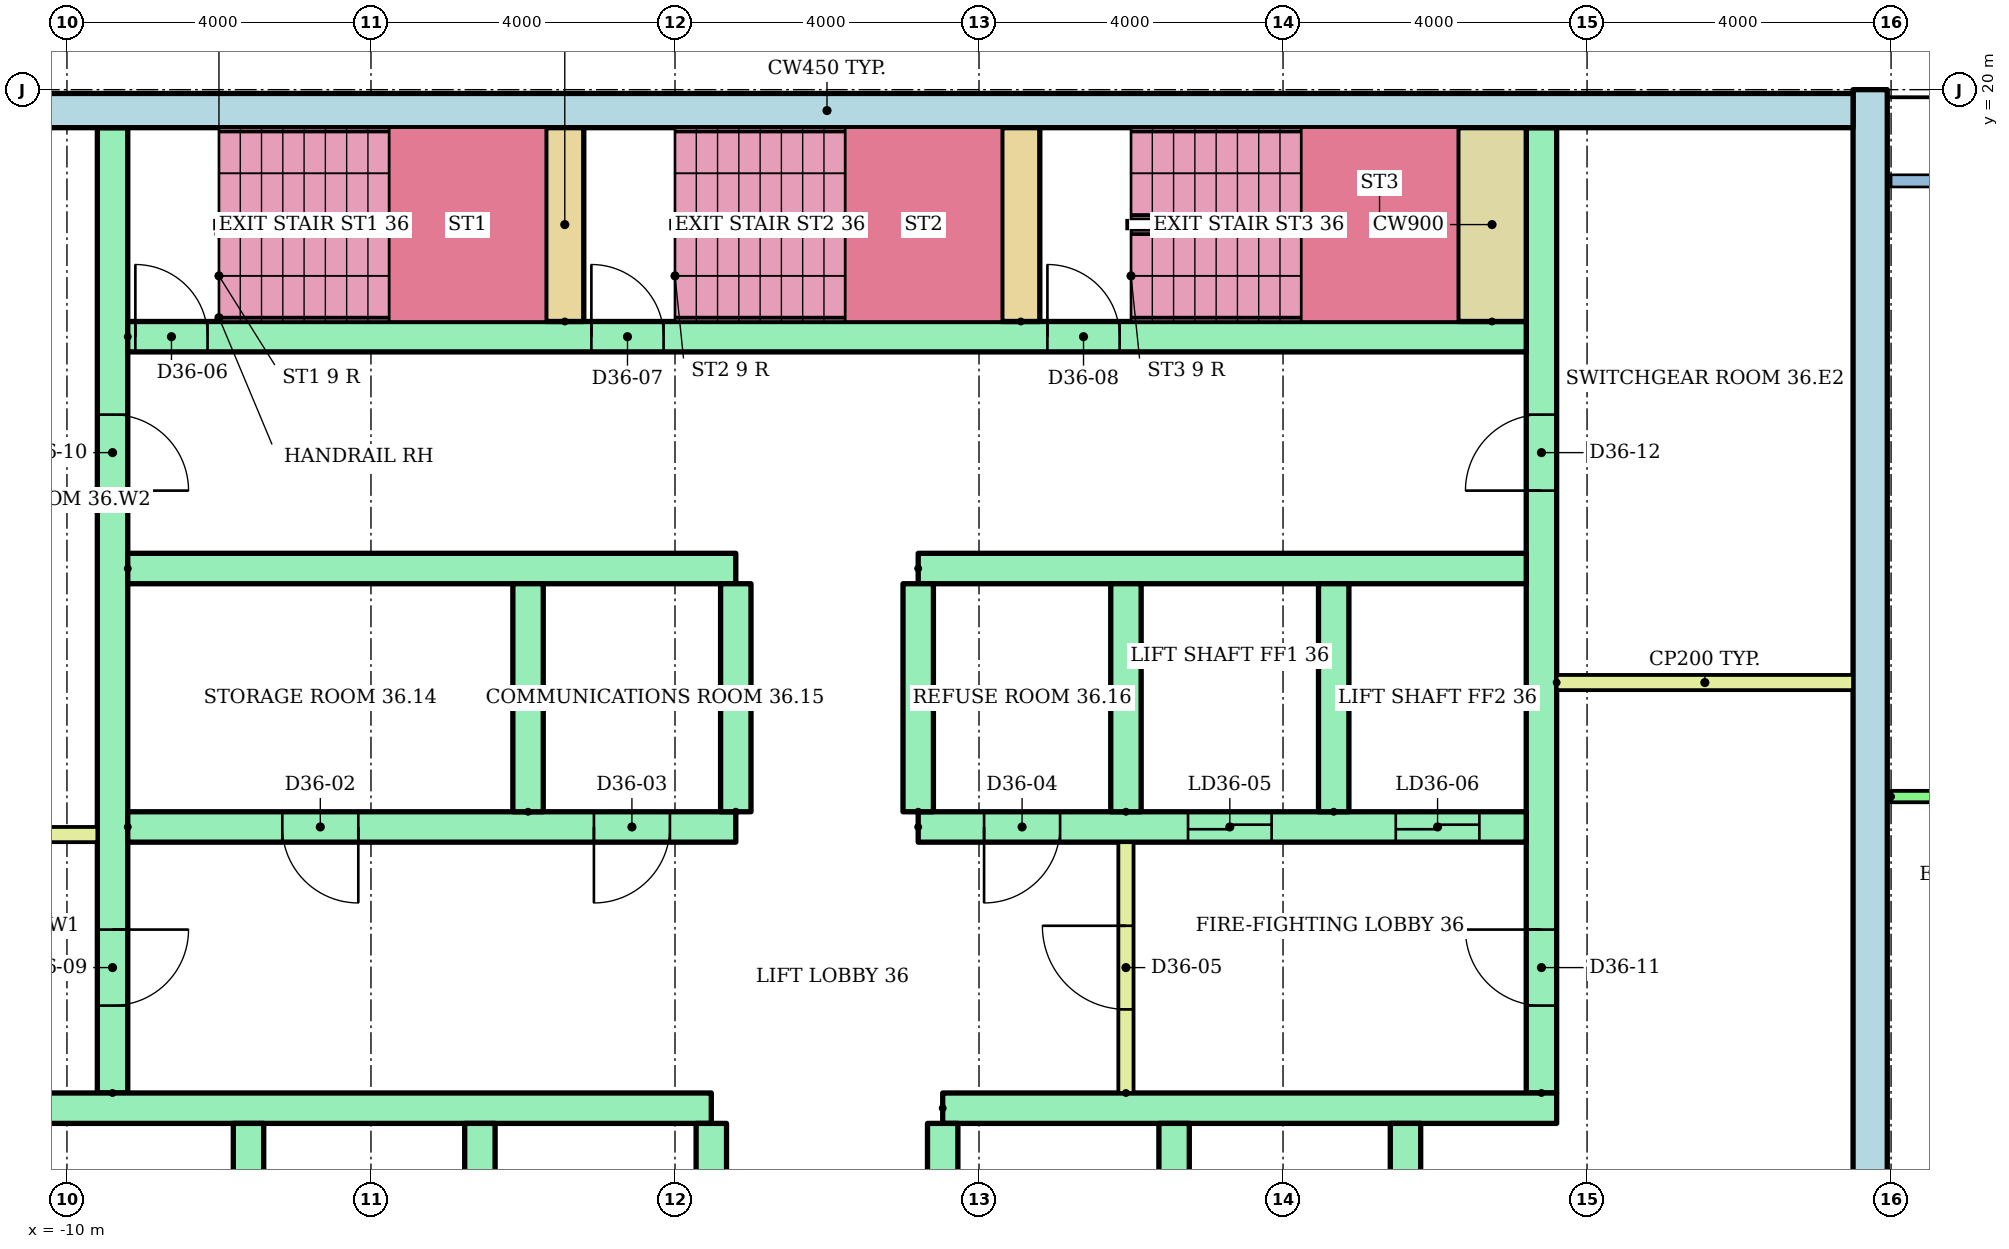
"""IFC4 building model, lengths in metres.
Left out: names, types, materials, properties, quantities, classifications, styles, units other than length and angle.
Written with IfcOpenShell. Run it as: python <this file> out.ifc"""

import sys

from ifc_helpers import new_model, si_unit, direction, frame, frame_2d, origin, place, context, subcontext, project, spatial, rectangle, extrude, element, fill, save


model = new_model("IFC4")
c1 = context("Model", 3, precision=1e-05, world=origin(), true_north=direction((0.0, 1.0)))
c2 = subcontext(c1, "Body", "Model", "MODEL_VIEW")
j1 = project(units=[si_unit("LENGTHUNIT", "METRE"), si_unit("PLANEANGLEUNIT", "RADIAN")], contexts=[c1])
p1 = place(None, origin())
s1 = spatial("IfcSite", under=j1, at=p1, CompositionType="ELEMENT")
p2 = place(p1, origin())
s2 = spatial("IfcBuilding", under=s1, at=p2, CompositionType="ELEMENT")
p3 = place(p2, frame((0.0, 0.0, 139.0)))
s3 = spatial("IfcBuildingStorey", under=s2, at=p3, CompositionType="ELEMENT", Elevation=139.0)
p4 = place(p3, frame((13.725, 3.0, 0.0), z_axis=(0.0, 0.0, 1.0), x_axis=(0.0, 1.0, 0.0)))
e1 = element("IfcWall", 1, at=p4, inside=s3, PredefinedType="SHEAR", context=c2, shape_type="SweptSolid", body=[
    extrude(rectangle(XDim=17.0, YDim=0.45, at=frame_2d((8.5, 0.0))), origin(), (0.0, 0.0, 1.0), 2.92),
])
p5 = place(p3, frame((-13.5, 19.725, 0.0)))
e2 = element("IfcWall", 2, at=p5, inside=s3, PredefinedType="SHEAR", context=c2, shape_type="SweptSolid", body=[
    extrude(rectangle(XDim=27.0, YDim=0.45, at=frame_2d((13.5, 0.0))), origin(), (0.0, 0.0, 1.0), 2.92),
])
p6 = place(p3, frame((-9.4, 6.8, 0.0), z_axis=(0.0, 0.0, 1.0), x_axis=(0.0, 1.0, 0.0)))
e3 = element("IfcWall", 3, at=p6, inside=s3, PredefinedType="SHEAR", context=c2, shape_type="SweptSolid", body=[
    extrude(rectangle(XDim=12.7, YDim=0.4, at=frame_2d((6.35, 0.0))), origin(), (0.0, 0.0, 1.0), 2.92),
])
p7 = place(p6, frame((1.15, 0.0, 0.0)))
e4 = element("IfcOpeningElement", 4, at=p7, cuts=e3, PredefinedType="OPENING", context=c2, shape_type="SweptSolid", body=[
    extrude(rectangle(XDim=1.0, YDim=2.1, at=frame_2d((0.5, 1.05))), frame((0.0, 0.21, 0.0), z_axis=(0.0, -1.0, 0.0), x_axis=(1.0, 0.0, 0.0)), (0.0, 0.0, 1.0), 0.42),
])
p8 = place(p6, frame((7.925, 0.0, 0.0)))
e5 = element("IfcOpeningElement", 5, at=p8, cuts=e3, PredefinedType="OPENING", context=c2, shape_type="SweptSolid", body=[
    extrude(rectangle(XDim=1.0, YDim=2.1, at=frame_2d((0.5, 1.05))), frame((0.0, 0.21, 0.0), z_axis=(0.0, -1.0, 0.0), x_axis=(1.0, 0.0, 0.0)), (0.0, 0.0, 1.0), 0.42),
])
p9 = place(p3, frame((9.4, 6.8, 0.0), z_axis=(0.0, 0.0, 1.0), x_axis=(0.0, 1.0, 0.0)))
e6 = element("IfcWall", 6, at=p9, inside=s3, PredefinedType="SHEAR", context=c2, shape_type="SweptSolid", body=[
    extrude(rectangle(XDim=12.7, YDim=0.4, at=frame_2d((6.35, 0.0))), origin(), (0.0, 0.0, 1.0), 2.92),
])
p10 = place(p9, frame((1.15, 0.0, 0.0)))
e7 = element("IfcOpeningElement", 7, at=p10, cuts=e6, PredefinedType="OPENING", context=c2, shape_type="SweptSolid", body=[
    extrude(rectangle(XDim=1.0, YDim=2.1, at=frame_2d((0.5, 1.05))), frame((0.0, 0.21, 0.0), z_axis=(0.0, -1.0, 0.0), x_axis=(1.0, 0.0, 0.0)), (0.0, 0.0, 1.0), 0.42),
])
p11 = place(p9, frame((7.925, 0.0, 0.0)))
e8 = element("IfcOpeningElement", 8, at=p11, cuts=e6, PredefinedType="OPENING", context=c2, shape_type="SweptSolid", body=[
    extrude(rectangle(XDim=1.0, YDim=2.1, at=frame_2d((0.5, 1.05))), frame((0.0, 0.21, 0.0), z_axis=(0.0, -1.0, 0.0), x_axis=(1.0, 0.0, 0.0)), (0.0, 0.0, 1.0), 0.42),
])
p12 = place(p3, frame((-13.5, 6.6, 0.0)))
e9 = element("IfcWall", 9, at=p12, inside=s3, PredefinedType="SHEAR", context=c2, shape_type="SweptSolid", body=[
    extrude(rectangle(XDim=11.978, YDim=0.4, at=frame_2d((5.989, 0.0))), origin(), (0.0, 0.0, 1.0), 2.92),
])
p13 = place(p3, frame((1.522, 6.6, 0.0)))
e10 = element("IfcWall", 10, at=p13, inside=s3, PredefinedType="SHEAR", context=c2, shape_type="SweptSolid", body=[
    extrude(rectangle(XDim=8.078, YDim=0.4, at=frame_2d((4.039, 0.0))), origin(), (0.0, 0.0, 1.0), 2.92),
])
for number, where, z_axis, x_axis in (
    (11, (-7.611, 3.4, 0.0), (0.0, 0.0, 1.0), (0.0, 1.0, 0.0)),
    (12, (-4.567, 3.4, 0.0), (0.0, 0.0, 1.0), (0.0, 1.0, 0.0)),
    (13, (-1.522, 3.4, 0.0), (0.0, 0.0, 1.0), (0.0, 1.0, 0.0)),
    (14, (1.522, 3.4, 0.0), (0.0, 0.0, 1.0), (0.0, 1.0, 0.0)),
    (15, (4.567, 3.4, 0.0), (0.0, 0.0, 1.0), (0.0, 1.0, 0.0)),
    (16, (7.611, 3.4, 0.0), (0.0, 0.0, 1.0), (0.0, 1.0, 0.0)),
):
    element("IfcWall", number, at=place(p3, frame(where, z_axis=z_axis, x_axis=x_axis)), inside=s3, PredefinedType="SHEAR", context=c2, shape_type="SweptSolid", body=[
        extrude(rectangle(XDim=3.0, YDim=0.4, at=frame_2d((1.5, 0.0))), origin(), (0.0, 0.0, 1.0), 2.92),
    ])
p14 = place(p3, frame((-9.2, 10.3, 0.0)))
e17 = element("IfcWall", 17, at=p14, inside=s3, PredefinedType="SHEAR", context=c2, shape_type="SweptSolid", body=[
    extrude(rectangle(XDim=8.0, YDim=0.4, at=frame_2d((4.0, 0.0))), origin(), (0.0, 0.0, 1.0), 2.92),
])
p15 = place(p14, frame((2.033, 0.0, 0.0)))
e18 = element("IfcOpeningElement", 18, at=p15, cuts=e17, PredefinedType="OPENING", context=c2, shape_type="SweptSolid", body=[
    extrude(rectangle(XDim=1.0, YDim=2.1, at=frame_2d((0.5, 1.05))), frame((0.0, 0.21, 0.0), z_axis=(0.0, -1.0, 0.0), x_axis=(1.0, 0.0, 0.0)), (0.0, 0.0, 1.0), 0.42),
])
p16 = place(p14, frame((6.133, 0.0, 0.0)))
e19 = element("IfcOpeningElement", 19, at=p16, cuts=e17, PredefinedType="OPENING", context=c2, shape_type="SweptSolid", body=[
    extrude(rectangle(XDim=1.0, YDim=2.1, at=frame_2d((0.5, 1.05))), frame((0.0, 0.21, 0.0), z_axis=(0.0, -1.0, 0.0), x_axis=(1.0, 0.0, 0.0)), (0.0, 0.0, 1.0), 0.42),
])
p17 = place(p3, frame((-9.2, 13.7, 0.0)))
e20 = element("IfcWall", 20, at=p17, inside=s3, PredefinedType="SHEAR", context=c2, shape_type="SweptSolid", body=[
    extrude(rectangle(XDim=8.0, YDim=0.4, at=frame_2d((4.0, 0.0))), origin(), (0.0, 0.0, 1.0), 2.92),
])
p18 = place(p3, frame((1.2, 10.3, 0.0)))
e21 = element("IfcWall", 21, at=p18, inside=s3, PredefinedType="SHEAR", context=c2, shape_type="SweptSolid", body=[
    extrude(rectangle(XDim=8.0, YDim=0.4, at=frame_2d((4.0, 0.0))), origin(), (0.0, 0.0, 1.0), 2.92),
])
p19 = place(p18, frame((3.55, 0.0, 0.0)))
e22 = element("IfcOpeningElement", 22, at=p19, cuts=e21, PredefinedType="OPENING", context=c2, shape_type="SweptSolid", body=[
    extrude(rectangle(XDim=1.1, YDim=2.1, at=frame_2d((0.55, 1.05))), frame((0.0, 0.21, 0.0), z_axis=(0.0, -1.0, 0.0), x_axis=(1.0, 0.0, 0.0)), (0.0, 0.0, 1.0), 0.42),
])
p20 = place(p18, frame((6.283, 0.0, 0.0)))
e23 = element("IfcOpeningElement", 23, at=p20, cuts=e21, PredefinedType="OPENING", context=c2, shape_type="SweptSolid", body=[
    extrude(rectangle(XDim=1.1, YDim=2.1, at=frame_2d((0.55, 1.05))), frame((0.0, 0.21, 0.0), z_axis=(0.0, -1.0, 0.0), x_axis=(1.0, 0.0, 0.0)), (0.0, 0.0, 1.0), 0.42),
])
p21 = place(p18, frame((0.867, 0.0, 0.0)))
e24 = element("IfcOpeningElement", 24, at=p21, cuts=e21, PredefinedType="OPENING", context=c2, shape_type="SweptSolid", body=[
    extrude(rectangle(XDim=1.0, YDim=2.1, at=frame_2d((0.5, 1.05))), frame((0.0, 0.21, 0.0), z_axis=(0.0, -1.0, 0.0), x_axis=(1.0, 0.0, 0.0)), (0.0, 0.0, 1.0), 0.42),
])
p22 = place(p3, frame((1.2, 13.7, 0.0)))
e25 = element("IfcWall", 25, at=p22, inside=s3, PredefinedType="SHEAR", context=c2, shape_type="SweptSolid", body=[
    extrude(rectangle(XDim=8.0, YDim=0.4, at=frame_2d((4.0, 0.0))), origin(), (0.0, 0.0, 1.0), 2.92),
])
for number, where, z_axis, x_axis in (
    (26, (-3.933, 10.5, 0.0), (0.0, 0.0, 1.0), (0.0, 1.0, 0.0)),
    (27, (-1.2, 10.5, 0.0), (0.0, 0.0, 1.0), (0.0, 1.0, 0.0)),
    (28, (1.2, 10.5, 0.0), (0.0, 0.0, 1.0), (0.0, 1.0, 0.0)),
    (29, (3.933, 10.5, 0.0), (0.0, 0.0, 1.0), (0.0, 1.0, 0.0)),
    (30, (6.667, 10.5, 0.0), (0.0, 0.0, 1.0), (0.0, 1.0, 0.0)),
):
    element("IfcWall", number, at=place(p3, frame(where, z_axis=z_axis, x_axis=x_axis)), inside=s3, PredefinedType="SHEAR", context=c2, shape_type="SweptSolid", body=[
        extrude(rectangle(XDim=3.0, YDim=0.4, at=frame_2d((1.5, 0.0))), origin(), (0.0, 0.0, 1.0), 2.92),
    ])
p23 = place(p3, frame((3.933, 6.8, 0.0), z_axis=(0.0, 0.0, 1.0), x_axis=(0.0, 1.0, 0.0)))
e31 = element("IfcWall", 31, at=p23, inside=s3, PredefinedType="PARTITIONING", context=c2, shape_type="SweptSolid", body=[
    extrude(rectangle(XDim=3.3, YDim=0.2, at=frame_2d((1.65, 0.0))), origin(), (0.0, 0.0, 1.0), 2.92),
])
p24 = place(p23, frame((1.1, 0.0, 0.0)))
e32 = element("IfcOpeningElement", 32, at=p24, cuts=e31, PredefinedType="OPENING", context=c2, shape_type="SweptSolid", body=[
    extrude(rectangle(XDim=1.1, YDim=2.1, at=frame_2d((0.55, 1.05))), frame((0.0, 0.11, 0.0), z_axis=(0.0, -1.0, 0.0), x_axis=(1.0, 0.0, 0.0)), (0.0, 0.0, 1.0), 0.22),
])
p25 = place(p3, frame((-9.2, 16.75, 0.0)))
e33 = element("IfcWall", 33, at=p25, inside=s3, PredefinedType="SHEAR", context=c2, shape_type="SweptSolid", body=[
    extrude(rectangle(XDim=18.4, YDim=0.4, at=frame_2d((9.2, 0.0))), origin(), (0.0, 0.0, 1.0), 2.92),
])
p26 = place(p25, frame((0.1, 0.0, 0.0)))
e34 = element("IfcOpeningElement", 34, at=p26, cuts=e33, PredefinedType="OPENING", context=c2, shape_type="SweptSolid", body=[
    extrude(rectangle(XDim=0.95, YDim=2.1, at=frame_2d((0.475, 1.05))), frame((0.0, 0.21, 0.0), z_axis=(0.0, -1.0, 0.0), x_axis=(1.0, 0.0, 0.0)), (0.0, 0.0, 1.0), 0.42),
])
p27 = place(p25, frame((6.1, 0.0, 0.0)))
e35 = element("IfcOpeningElement", 35, at=p27, cuts=e33, PredefinedType="OPENING", context=c2, shape_type="SweptSolid", body=[
    extrude(rectangle(XDim=0.95, YDim=2.1, at=frame_2d((0.475, 1.05))), frame((0.0, 0.21, 0.0), z_axis=(0.0, -1.0, 0.0), x_axis=(1.0, 0.0, 0.0)), (0.0, 0.0, 1.0), 0.42),
])
p28 = place(p25, frame((12.1, 0.0, 0.0)))
e36 = element("IfcOpeningElement", 36, at=p28, cuts=e33, PredefinedType="OPENING", context=c2, shape_type="SweptSolid", body=[
    extrude(rectangle(XDim=0.95, YDim=2.1, at=frame_2d((0.475, 1.05))), frame((0.0, 0.21, 0.0), z_axis=(0.0, -1.0, 0.0), x_axis=(1.0, 0.0, 0.0)), (0.0, 0.0, 1.0), 0.42),
])
for number, where, z_axis, x_axis in (
    (37, (-3.45, 16.95, 0.0), (0.0, 0.0, 1.0), (0.0, 1.0, 0.0)),
    (38, (2.55, 16.95, 0.0), (0.0, 0.0, 1.0), (0.0, 1.0, 0.0)),
):
    element("IfcWall", number, at=place(p3, frame(where, z_axis=z_axis, x_axis=x_axis)), inside=s3, PredefinedType="SHEAR", context=c2, shape_type="SweptSolid", body=[
        extrude(rectangle(XDim=2.55, YDim=0.5, at=frame_2d((1.275, 0.0))), origin(), (0.0, 0.0, 1.0), 2.92),
    ])
p29 = place(p3, frame((8.75, 16.95, 0.0), z_axis=(0.0, 0.0, 1.0), x_axis=(0.0, 1.0, 0.0)))
e39 = element("IfcWall", 39, at=p29, inside=s3, PredefinedType="SHEAR", context=c2, shape_type="SweptSolid", body=[
    extrude(rectangle(XDim=2.55, YDim=0.9, at=frame_2d((1.275, 0.0))), origin(), (0.0, 0.0, 1.0), 2.92),
])
for number, where in (
    (40, (-13.5, 10.2, 0.0)),
    (41, (9.6, 12.2, 0.0)),
):
    element("IfcWall", number, at=place(p3, frame(where)), inside=s3, PredefinedType="PARTITIONING", context=c2, shape_type="SweptSolid", body=[
        extrude(rectangle(XDim=3.9, YDim=0.2, at=frame_2d((1.95, 0.0))), origin(), (0.0, 0.0, 1.0), 2.92),
    ])
p30 = place(p3, frame((14.0, 10.7, 0.0)))
e42 = element("IfcWall", 42, at=p30, inside=s3, PredefinedType="PARTITIONING", context=c2, shape_type="SweptSolid", body=[
    extrude(rectangle(XDim=18.71, YDim=0.15, at=frame_2d((9.355, 0.0))), origin(), (0.0, 0.0, 1.0), 2.4),
])
p31 = place(p30, frame((1.5, 0.0, 0.0)))
e43 = element("IfcOpeningElement", 43, at=p31, cuts=e42, PredefinedType="OPENING", context=c2, shape_type="SweptSolid", body=[
    extrude(rectangle(XDim=1.0, YDim=2.1, at=frame_2d((0.5, 1.05))), frame((0.0, 0.085, 0.0), z_axis=(0.0, -1.0, 0.0), x_axis=(1.0, 0.0, 0.0)), (0.0, 0.0, 1.0), 0.17),
])
p32 = place(p30, frame((7.55, 0.0, 0.0)))
e44 = element("IfcOpeningElement", 44, at=p32, cuts=e42, PredefinedType="OPENING", context=c2, shape_type="SweptSolid", body=[
    extrude(rectangle(XDim=0.9, YDim=2.1, at=frame_2d((0.45, 1.05))), frame((0.0, 0.085, 0.0), z_axis=(0.0, -1.0, 0.0), x_axis=(1.0, 0.0, 0.0)), (0.0, 0.0, 1.0), 0.17),
])
p33 = place(p30, frame((14.8, 0.0, 0.0)))
e45 = element("IfcOpeningElement", 45, at=p33, cuts=e42, PredefinedType="OPENING", context=c2, shape_type="SweptSolid", body=[
    extrude(rectangle(XDim=0.9, YDim=2.1, at=frame_2d((0.45, 1.05))), frame((0.0, 0.085, 0.0), z_axis=(0.0, -1.0, 0.0), x_axis=(1.0, 0.0, 0.0)), (0.0, 0.0, 1.0), 0.17),
])
p34 = place(p19, origin())
e46 = element("IfcDoor", 46, at=p34, inside=s3, OperationType="SLIDING_TO_LEFT", PredefinedType="DOOR", context=c2, shape_type="SweptSolid", body=[
    extrude(rectangle(XDim=1.1, YDim=2.1, at=frame_2d((0.55, 1.05))), frame((0.0, 0.025, 0.0), z_axis=(0.0, -1.0, 0.0), x_axis=(1.0, 0.0, 0.0)), (0.0, 0.0, 1.0), 0.05),
])
fill(e22, e46)
p35 = place(p20, origin())
e47 = element("IfcDoor", 47, at=p35, inside=s3, OperationType="SLIDING_TO_LEFT", PredefinedType="DOOR", context=c2, shape_type="SweptSolid", body=[
    extrude(rectangle(XDim=1.1, YDim=2.1, at=frame_2d((0.55, 1.05))), frame((0.0, 0.025, 0.0), z_axis=(0.0, -1.0, 0.0), x_axis=(1.0, 0.0, 0.0)), (0.0, 0.0, 1.0), 0.05),
])
fill(e23, e47)
p36 = place(p15, frame((1.0, 0.0, 0.0), z_axis=(0.0, 0.0, 1.0), x_axis=(-1.0, 0.0, 0.0)))
e48 = element("IfcDoor", 48, at=p36, inside=s3, OperationType="SINGLE_SWING_RIGHT", PredefinedType="DOOR", context=c2, shape_type="SweptSolid", body=[
    extrude(rectangle(XDim=1.0, YDim=2.1, at=frame_2d((0.5, 1.05))), frame((0.0, 0.025, 0.0), z_axis=(0.0, -1.0, 0.0), x_axis=(1.0, 0.0, 0.0)), (0.0, 0.0, 1.0), 0.05),
])
fill(e18, e48)
p37 = place(p16, frame((1.0, 0.0, 0.0), z_axis=(0.0, 0.0, 1.0), x_axis=(-1.0, 0.0, 0.0)))
e49 = element("IfcDoor", 49, at=p37, inside=s3, OperationType="SINGLE_SWING_LEFT", PredefinedType="DOOR", context=c2, shape_type="SweptSolid", body=[
    extrude(rectangle(XDim=1.0, YDim=2.1, at=frame_2d((0.5, 1.05))), frame((0.0, 0.025, 0.0), z_axis=(0.0, -1.0, 0.0), x_axis=(1.0, 0.0, 0.0)), (0.0, 0.0, 1.0), 0.05),
])
fill(e19, e49)
p38 = place(p21, frame((1.0, 0.0, 0.0), z_axis=(0.0, 0.0, 1.0), x_axis=(-1.0, 0.0, 0.0)))
e50 = element("IfcDoor", 50, at=p38, inside=s3, OperationType="SINGLE_SWING_LEFT", PredefinedType="DOOR", context=c2, shape_type="SweptSolid", body=[
    extrude(rectangle(XDim=1.0, YDim=2.1, at=frame_2d((0.5, 1.05))), frame((0.0, 0.025, 0.0), z_axis=(0.0, -1.0, 0.0), x_axis=(1.0, 0.0, 0.0)), (0.0, 0.0, 1.0), 0.05),
])
fill(e24, e50)
p39 = place(p24, origin())
e51 = element("IfcDoor", 51, at=p39, inside=s3, OperationType="SINGLE_SWING_RIGHT", PredefinedType="DOOR", context=c2, shape_type="SweptSolid", body=[
    extrude(rectangle(XDim=1.1, YDim=2.1, at=frame_2d((0.55, 1.05))), frame((0.0, 0.025, 0.0), z_axis=(0.0, -1.0, 0.0), x_axis=(1.0, 0.0, 0.0)), (0.0, 0.0, 1.0), 0.05),
])
fill(e32, e51)
p40 = place(p26, origin())
e52 = element("IfcDoor", 52, at=p40, inside=s3, OperationType="SINGLE_SWING_LEFT", PredefinedType="DOOR", context=c2, shape_type="SweptSolid", body=[
    extrude(rectangle(XDim=0.95, YDim=2.1, at=frame_2d((0.475, 1.05))), frame((0.0, 0.025, 0.0), z_axis=(0.0, -1.0, 0.0), x_axis=(1.0, 0.0, 0.0)), (0.0, 0.0, 1.0), 0.05),
])
fill(e34, e52)
p41 = place(p27, origin())
e53 = element("IfcDoor", 53, at=p41, inside=s3, OperationType="SINGLE_SWING_LEFT", PredefinedType="DOOR", context=c2, shape_type="SweptSolid", body=[
    extrude(rectangle(XDim=0.95, YDim=2.1, at=frame_2d((0.475, 1.05))), frame((0.0, 0.025, 0.0), z_axis=(0.0, -1.0, 0.0), x_axis=(1.0, 0.0, 0.0)), (0.0, 0.0, 1.0), 0.05),
])
fill(e35, e53)
p42 = place(p28, origin())
e54 = element("IfcDoor", 54, at=p42, inside=s3, OperationType="SINGLE_SWING_LEFT", PredefinedType="DOOR", context=c2, shape_type="SweptSolid", body=[
    extrude(rectangle(XDim=0.95, YDim=2.1, at=frame_2d((0.475, 1.05))), frame((0.0, 0.025, 0.0), z_axis=(0.0, -1.0, 0.0), x_axis=(1.0, 0.0, 0.0)), (0.0, 0.0, 1.0), 0.05),
])
fill(e36, e54)
p43 = place(p7, frame((1.0, 0.0, 0.0), z_axis=(0.0, 0.0, 1.0), x_axis=(-1.0, 0.0, 0.0)))
e55 = element("IfcDoor", 55, at=p43, inside=s3, OperationType="SINGLE_SWING_RIGHT", PredefinedType="DOOR", context=c2, shape_type="SweptSolid", body=[
    extrude(rectangle(XDim=1.0, YDim=2.1, at=frame_2d((0.5, 1.05))), frame((0.0, 0.025, 0.0), z_axis=(0.0, -1.0, 0.0), x_axis=(1.0, 0.0, 0.0)), (0.0, 0.0, 1.0), 0.05),
])
fill(e4, e55)
p44 = place(p8, frame((1.0, 0.0, 0.0), z_axis=(0.0, 0.0, 1.0), x_axis=(-1.0, 0.0, 0.0)))
e56 = element("IfcDoor", 56, at=p44, inside=s3, OperationType="SINGLE_SWING_LEFT", PredefinedType="DOOR", context=c2, shape_type="SweptSolid", body=[
    extrude(rectangle(XDim=1.0, YDim=2.1, at=frame_2d((0.5, 1.05))), frame((0.0, 0.025, 0.0), z_axis=(0.0, -1.0, 0.0), x_axis=(1.0, 0.0, 0.0)), (0.0, 0.0, 1.0), 0.05),
])
fill(e5, e56)
p45 = place(p10, origin())
e57 = element("IfcDoor", 57, at=p45, inside=s3, OperationType="SINGLE_SWING_RIGHT", PredefinedType="DOOR", context=c2, shape_type="SweptSolid", body=[
    extrude(rectangle(XDim=1.0, YDim=2.1, at=frame_2d((0.5, 1.05))), frame((0.0, 0.025, 0.0), z_axis=(0.0, -1.0, 0.0), x_axis=(1.0, 0.0, 0.0)), (0.0, 0.0, 1.0), 0.05),
])
fill(e7, e57)
p46 = place(p11, origin())
e58 = element("IfcDoor", 58, at=p46, inside=s3, OperationType="SINGLE_SWING_LEFT", PredefinedType="DOOR", context=c2, shape_type="SweptSolid", body=[
    extrude(rectangle(XDim=1.0, YDim=2.1, at=frame_2d((0.5, 1.05))), frame((0.0, 0.025, 0.0), z_axis=(0.0, -1.0, 0.0), x_axis=(1.0, 0.0, 0.0)), (0.0, 0.0, 1.0), 0.05),
])
fill(e8, e58)
save(model, sys.argv[1])
